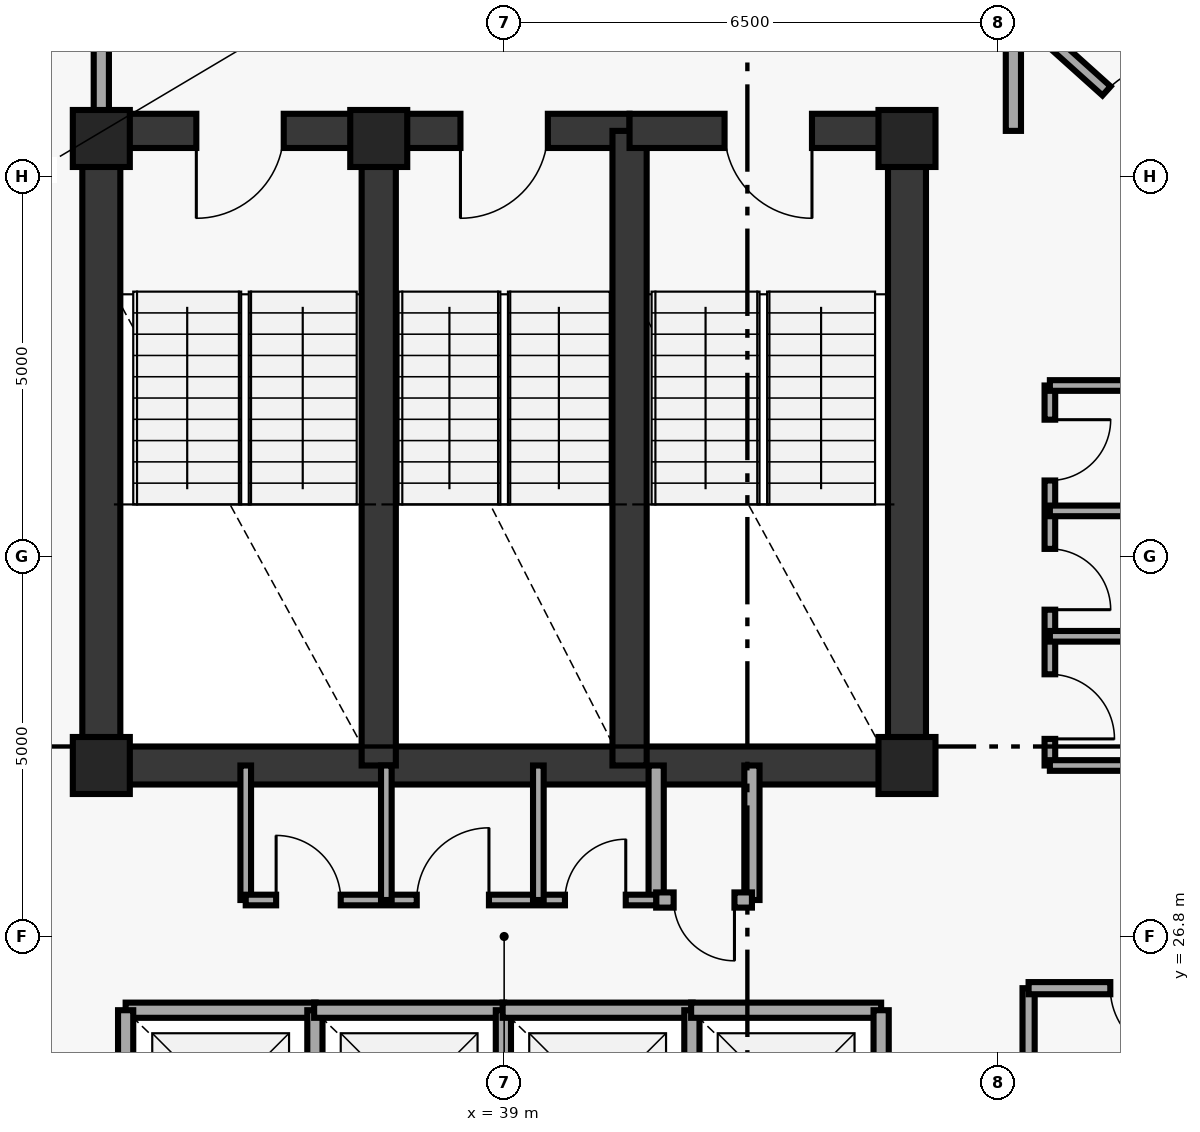
"""IFC4 building model, lengths in metres.
Left out: names, types, materials, properties, quantities, classifications, styles, units other than length and angle.
Written with IfcOpenShell. Run it as: python <this file> out.ifc"""

import sys

from ifc_helpers import new_model, si_unit, direction, frame, frame_2d, origin, origin_2d, place, context, subcontext, project, spatial, rectangle, extrude, element, fill, save


model = new_model("IFC4")
c1 = context("Model", 3, precision=1e-05, world=origin(), true_north=direction((0.0, 1.0)))
c2 = subcontext(c1, "Body", "Model", "MODEL_VIEW")
j1 = project(units=[si_unit("LENGTHUNIT", "METRE"), si_unit("PLANEANGLEUNIT", "RADIAN")], contexts=[c1])
p1 = place(None, origin())
s1 = spatial("IfcSite", under=j1, at=p1, CompositionType="ELEMENT")
p2 = place(p1, origin())
s2 = spatial("IfcBuilding", under=s1, at=p2, CompositionType="ELEMENT")
p3 = place(p2, frame((0.0, 0.0, 255.6)))
s3 = spatial("IfcBuildingStorey", under=s2, at=p3, CompositionType="ELEMENT", Elevation=255.6)
for number, where, z_axis, x_axis in (
    (1, (44.3, 29.05, 0.0), (0.0, 0.0, 1.0), (1.0, 0.0, 0.0)),
    (2, (44.3, 37.3, 0.0), (0.0, 0.0, 1.0), (1.0, 0.0, 0.0)),
    (3, (37.35, 37.3, 0.0), (0.0, 0.0, 1.0), (1.0, 0.0, 0.0)),
    (4, (33.7, 37.3, 0.0), (0.0, 0.0, 1.0), (1.0, 0.0, 0.0)),
    (5, (33.7, 29.05, 0.0), (0.0, 0.0, 1.0), (1.0, 0.0, 0.0)),
):
    element("IfcColumn", number, at=place(p3, frame(where, z_axis=z_axis, x_axis=x_axis)), inside=s3, PredefinedType="PILASTER", context=c2, shape_type="SweptSolid", body=[
        extrude(rectangle(XDim=0.75, YDim=0.75, at=origin_2d()), origin(), (0.0, 0.0, 1.0), 3.54),
    ])
for number, where, z_axis, x_axis in (
    (6, (33.7, 29.05, 0.0), (0.0, 0.0, 1.0), (0.0, 1.0, 0.0)),
    (7, (44.3, 29.05, 0.0), (0.0, 0.0, 1.0), (0.0, 1.0, 0.0)),
):
    element("IfcWall", number, at=place(p3, frame(where, z_axis=z_axis, x_axis=x_axis)), inside=s3, PredefinedType="SHEAR", context=c2, shape_type="SweptSolid", body=[
        extrude(rectangle(XDim=8.35, YDim=0.5, at=frame_2d((4.175, 0.0))), origin(), (0.0, 0.0, 1.0), 3.54),
    ])
p4 = place(p3, frame((33.7, 29.05, 0.0), z_axis=(0.0, 0.0, 1.0), x_axis=(1.0, 0.0, 0.0)))
e8 = element("IfcWall", 8, at=p4, inside=s3, PredefinedType="SHEAR", context=c2, shape_type="SweptSolid", body=[
    extrude(rectangle(XDim=10.6, YDim=0.5, at=frame_2d((5.3, 0.0))), origin(), (0.0, 0.0, 1.0), 3.54),
])
p5 = place(p3, frame((37.35, 37.4, 0.0), z_axis=(0.0, 0.0, 1.0), x_axis=(-1.0, 0.0, 0.0)))
e9 = element("IfcWall", 9, at=p5, inside=s3, PredefinedType="SHEAR", context=c2, shape_type="SweptSolid", body=[
    extrude(rectangle(XDim=3.65, YDim=0.45, at=frame_2d((1.825, 0.0))), origin(), (0.0, 0.0, 1.0), 3.54),
])
p6 = place(p5, frame((1.25, 0.0, 0.0)))
e10 = element("IfcOpeningElement", 10, at=p6, cuts=e9, PredefinedType="OPENING", context=c2, shape_type="SweptSolid", body=[
    extrude(rectangle(XDim=1.15, YDim=2.15, at=frame_2d((0.575, 1.075))), frame((0.0, 0.235, 0.0), z_axis=(0.0, -1.0, 0.0), x_axis=(1.0, 0.0, 0.0)), (0.0, 0.0, 1.0), 0.47),
])
p7 = place(p3, frame((37.35, 29.05, 0.0), z_axis=(0.0, 0.0, 1.0), x_axis=(0.0, 1.0, 0.0)))
e11 = element("IfcWall", 11, at=p7, inside=s3, PredefinedType="SHEAR", context=c2, shape_type="SweptSolid", body=[
    extrude(rectangle(XDim=8.35, YDim=0.45, at=frame_2d((4.175, 0.0))), origin(), (0.0, 0.0, 1.0), 3.54),
])
p8 = place(p3, frame((40.65, 37.4, 0.0), z_axis=(0.0, 0.0, 1.0), x_axis=(-1.0, 0.0, 0.0)))
e12 = element("IfcWall", 12, at=p8, inside=s3, PredefinedType="SHEAR", context=c2, shape_type="SweptSolid", body=[
    extrude(rectangle(XDim=3.3, YDim=0.45, at=frame_2d((1.65, 0.0))), origin(), (0.0, 0.0, 1.0), 3.54),
])
p9 = place(p8, frame((1.075, 0.0, 0.0)))
e13 = element("IfcOpeningElement", 13, at=p9, cuts=e12, PredefinedType="OPENING", context=c2, shape_type="SweptSolid", body=[
    extrude(rectangle(XDim=1.15, YDim=2.15, at=frame_2d((0.575, 1.075))), frame((0.0, 0.235, 0.0), z_axis=(0.0, -1.0, 0.0), x_axis=(1.0, 0.0, 0.0)), (0.0, 0.0, 1.0), 0.47),
])
p10 = place(p3, frame((40.65, 29.05, 0.0), z_axis=(0.0, 0.0, 1.0), x_axis=(0.0, 1.0, 0.0)))
e14 = element("IfcWall", 14, at=p10, inside=s3, PredefinedType="SHEAR", context=c2, shape_type="SweptSolid", body=[
    extrude(rectangle(XDim=8.35, YDim=0.45, at=frame_2d((4.175, 0.0))), origin(), (0.0, 0.0, 1.0), 3.54),
])
p11 = place(p3, frame((44.3, 37.4, 0.0), z_axis=(0.0, 0.0, 1.0), x_axis=(-1.0, 0.0, 0.0)))
e15 = element("IfcWall", 15, at=p11, inside=s3, PredefinedType="SHEAR", context=c2, shape_type="SweptSolid", body=[
    extrude(rectangle(XDim=3.65, YDim=0.45, at=frame_2d((1.825, 0.0))), origin(), (0.0, 0.0, 1.0), 3.54),
])
p12 = place(p11, frame((1.25, 0.0, 0.0)))
e16 = element("IfcOpeningElement", 16, at=p12, cuts=e15, PredefinedType="OPENING", context=c2, shape_type="SweptSolid", body=[
    extrude(rectangle(XDim=1.15, YDim=2.15, at=frame_2d((0.575, 1.075))), frame((0.0, 0.235, 0.0), z_axis=(0.0, -1.0, 0.0), x_axis=(1.0, 0.0, 0.0)), (0.0, 0.0, 1.0), 0.47),
])
for number, where, z_axis, x_axis in (
    (17, (33.7, 37.4, 0.0), (0.0, 0.0, 1.0), (0.0, 1.0, 0.0)),
    (18, (45.7, 37.4, 0.0), (0.0, 0.0, 1.0), (0.0, 1.0, 0.0)),
):
    element("IfcWall", number, at=place(p3, frame(where, z_axis=z_axis, x_axis=x_axis)), inside=s3, PredefinedType="SOLIDWALL", context=c2, shape_type="SweptSolid", body=[
        extrude(rectangle(XDim=1.88, YDim=0.2, at=frame_2d((0.94, 0.0))), origin(), (0.0, 0.0, 1.0), 3.54),
    ])
p13 = place(p3, frame((35.6, 27.28, 0.0), z_axis=(0.0, 0.0, 1.0), x_axis=(0.0, 1.0, 0.0)))
e19 = element("IfcWall", 19, at=p13, inside=s3, PredefinedType="PARTITIONING", context=c2, shape_type="SweptSolid", body=[
    extrude(rectangle(XDim=1.77, YDim=0.14, at=frame_2d((0.885, 0.0))), origin(), (0.0, 0.0, 1.0), 3.54),
])
for number, where, z_axis, x_axis in (
    (20, (41.0, 27.28, 0.0), (0.0, 0.0, 1.0), (0.0, 1.0, 0.0)),
    (21, (42.26, 27.28, 0.0), (0.0, 0.0, 1.0), (0.0, 1.0, 0.0)),
):
    element("IfcWall", number, at=place(p3, frame(where, z_axis=z_axis, x_axis=x_axis)), inside=s3, PredefinedType="SOLIDWALL", context=c2, shape_type="SweptSolid", body=[
        extrude(rectangle(XDim=1.77, YDim=0.2, at=frame_2d((0.885, 0.0))), origin(), (0.0, 0.0, 1.0), 3.54),
    ])
p14 = place(p3, frame((41.0, 27.28, 0.0), z_axis=(0.0, 0.0, 1.0), x_axis=(1.0, 0.0, 0.0)))
e22 = element("IfcWall", 22, at=p14, inside=s3, PredefinedType="SOLIDWALL", context=c2, shape_type="SweptSolid", body=[
    extrude(rectangle(XDim=1.26, YDim=0.2, at=frame_2d((0.63, 0.0))), origin(), (0.0, 0.0, 1.0), 3.54),
])
p15 = place(p14, frame((0.23, 0.0, 0.0)))
e23 = element("IfcOpeningElement", 23, at=p15, cuts=e22, PredefinedType="OPENING", context=c2, shape_type="SweptSolid", body=[
    extrude(rectangle(XDim=0.8, YDim=2.05, at=frame_2d((0.4, 1.025))), frame((0.0, 0.11, 0.0), z_axis=(0.0, -1.0, 0.0), x_axis=(1.0, 0.0, 0.0)), (0.0, 0.0, 1.0), 0.22),
])
p16 = place(p3, frame((34.02, 25.83, 0.0), z_axis=(0.0, 0.0, 1.0), x_axis=(1.0, 0.0, 0.0)))
e24 = element("IfcWall", 24, at=p16, inside=s3, PredefinedType="SOLIDWALL", context=c2, shape_type="SweptSolid", body=[
    extrude(rectangle(XDim=2.5, YDim=0.2, at=frame_2d((1.25, 0.0))), origin(), (0.0, 0.0, 1.0), 3.54),
])
for number, where, z_axis, x_axis in (
    (25, (34.02, 23.42, 0.0), (0.0, 0.0, 1.0), (0.0, 1.0, 0.0)),
    (26, (36.51, 23.42, 0.0), (0.0, 0.0, 1.0), (0.0, 1.0, 0.0)),
):
    element("IfcWall", number, at=place(p3, frame(where, z_axis=z_axis, x_axis=x_axis)), inside=s3, PredefinedType="SOLIDWALL", context=c2, shape_type="SweptSolid", body=[
        extrude(rectangle(XDim=2.41, YDim=0.2, at=frame_2d((1.205, 0.0))), origin(), (0.0, 0.0, 1.0), 3.54),
    ])
p17 = place(p3, frame((36.5, 25.83, 0.0), z_axis=(0.0, 0.0, 1.0), x_axis=(1.0, 0.0, 0.0)))
e27 = element("IfcWall", 27, at=p17, inside=s3, PredefinedType="SOLIDWALL", context=c2, shape_type="SweptSolid", body=[
    extrude(rectangle(XDim=2.5, YDim=0.2, at=frame_2d((1.25, 0.0))), origin(), (0.0, 0.0, 1.0), 3.54),
])
p18 = place(p3, frame((38.99, 23.42, 0.0), z_axis=(0.0, 0.0, 1.0), x_axis=(0.0, 1.0, 0.0)))
e28 = element("IfcWall", 28, at=p18, inside=s3, PredefinedType="SOLIDWALL", context=c2, shape_type="SweptSolid", body=[
    extrude(rectangle(XDim=2.41, YDim=0.2, at=frame_2d((1.205, 0.0))), origin(), (0.0, 0.0, 1.0), 3.54),
])
p19 = place(p3, frame((38.98, 25.83, 0.0), z_axis=(0.0, 0.0, 1.0), x_axis=(1.0, 0.0, 0.0)))
e29 = element("IfcWall", 29, at=p19, inside=s3, PredefinedType="SOLIDWALL", context=c2, shape_type="SweptSolid", body=[
    extrude(rectangle(XDim=2.5, YDim=0.2, at=frame_2d((1.25, 0.0))), origin(), (0.0, 0.0, 1.0), 3.54),
])
p20 = place(p3, frame((41.47, 23.42, 0.0), z_axis=(0.0, 0.0, 1.0), x_axis=(0.0, 1.0, 0.0)))
e30 = element("IfcWall", 30, at=p20, inside=s3, PredefinedType="SOLIDWALL", context=c2, shape_type="SweptSolid", body=[
    extrude(rectangle(XDim=2.41, YDim=0.2, at=frame_2d((1.205, 0.0))), origin(), (0.0, 0.0, 1.0), 3.54),
])
p21 = place(p3, frame((41.46, 25.83, 0.0), z_axis=(0.0, 0.0, 1.0), x_axis=(1.0, 0.0, 0.0)))
e31 = element("IfcWall", 31, at=p21, inside=s3, PredefinedType="SOLIDWALL", context=c2, shape_type="SweptSolid", body=[
    extrude(rectangle(XDim=2.5, YDim=0.2, at=frame_2d((1.25, 0.0))), origin(), (0.0, 0.0, 1.0), 3.54),
])
p22 = place(p3, frame((43.96, 23.42, 0.0), z_axis=(0.0, 0.0, 1.0), x_axis=(0.0, 1.0, 0.0)))
e32 = element("IfcWall", 32, at=p22, inside=s3, PredefinedType="SOLIDWALL", context=c2, shape_type="SweptSolid", body=[
    extrude(rectangle(XDim=2.41, YDim=0.2, at=frame_2d((1.205, 0.0))), origin(), (0.0, 0.0, 1.0), 3.54),
])
p23 = place(p3, frame((45.9, 19.05, 0.0), z_axis=(0.0, 0.0, 1.0), x_axis=(0.0, 1.0, 0.0)))
e33 = element("IfcWall", 33, at=p23, inside=s3, PredefinedType="PARTITIONING", context=c2, shape_type="SweptSolid", body=[
    extrude(rectangle(XDim=7.07, YDim=0.16, at=frame_2d((3.535, 0.0))), origin(), (0.0, 0.0, 1.0), 3.54),
])
p24 = place(p3, frame((48.95, 26.12, 0.0), z_axis=(0.0, 0.0, 1.0), x_axis=(-1.0, 0.0, 0.0)))
e34 = element("IfcWall", 34, at=p24, inside=s3, PredefinedType="PARTITIONING", context=c2, shape_type="SweptSolid", body=[
    extrude(rectangle(XDim=3.05, YDim=0.16, at=frame_2d((1.525, 0.0))), origin(), (0.0, 0.0, 1.0), 3.54),
])
p25 = place(p24, frame((1.075, 0.0, 0.0)))
e35 = element("IfcOpeningElement", 35, at=p25, cuts=e34, PredefinedType="OPENING", context=c2, shape_type="SweptSolid", body=[
    extrude(rectangle(XDim=0.9, YDim=2.1, at=frame_2d((0.45, 1.05))), frame((0.0, 0.09, 0.0), z_axis=(0.0, -1.0, 0.0), x_axis=(1.0, 0.0, 0.0)), (0.0, 0.0, 1.0), 0.18),
])
p26 = place(p3, frame((35.6, 27.28, 0.0), z_axis=(0.0, 0.0, 1.0), x_axis=(1.0, 0.0, 0.0)))
e36 = element("IfcWall", 36, at=p26, inside=s3, PredefinedType="PARTITIONING", context=c2, shape_type="SweptSolid", body=[
    extrude(rectangle(XDim=5.4, YDim=0.14, at=frame_2d((2.7, 0.0))), origin(), (0.0, 0.0, 1.0), 3.54),
])
p27 = place(p26, frame((0.4, 0.0, 0.0)))
e37 = element("IfcOpeningElement", 37, at=p27, cuts=e36, PredefinedType="OPENING", context=c2, shape_type="SweptSolid", body=[
    extrude(rectangle(XDim=0.85, YDim=2.1, at=frame_2d((0.425, 1.05))), frame((0.0, 0.08, 0.0), z_axis=(0.0, -1.0, 0.0), x_axis=(1.0, 0.0, 0.0)), (0.0, 0.0, 1.0), 0.16),
])
p28 = place(p26, frame((2.25, 0.0, 0.0)))
e38 = element("IfcOpeningElement", 38, at=p28, cuts=e36, PredefinedType="OPENING", context=c2, shape_type="SweptSolid", body=[
    extrude(rectangle(XDim=0.95, YDim=2.1, at=frame_2d((0.475, 1.05))), frame((0.0, 0.08, 0.0), z_axis=(0.0, -1.0, 0.0), x_axis=(1.0, 0.0, 0.0)), (0.0, 0.0, 1.0), 0.16),
])
p29 = place(p26, frame((4.2, 0.0, 0.0)))
e39 = element("IfcOpeningElement", 39, at=p29, cuts=e36, PredefinedType="OPENING", context=c2, shape_type="SweptSolid", body=[
    extrude(rectangle(XDim=0.8, YDim=2.05, at=frame_2d((0.4, 1.025))), frame((0.0, 0.08, 0.0), z_axis=(0.0, -1.0, 0.0), x_axis=(1.0, 0.0, 0.0)), (0.0, 0.0, 1.0), 0.16),
])
for number, where, z_axis, x_axis in (
    (40, (37.45, 27.28, 0.0), (0.0, 0.0, 1.0), (0.0, 1.0, 0.0)),
    (41, (39.45, 27.28, 0.0), (0.0, 0.0, 1.0), (0.0, 1.0, 0.0)),
):
    element("IfcWall", number, at=place(p3, frame(where, z_axis=z_axis, x_axis=x_axis)), inside=s3, PredefinedType="PARTITIONING", context=c2, shape_type="SweptSolid", body=[
        extrude(rectangle(XDim=1.77, YDim=0.14, at=frame_2d((0.885, 0.0))), origin(), (0.0, 0.0, 1.0), 3.54),
    ])
p30 = place(p3, frame((46.18, 34.05, 0.0), z_axis=(0.0, 0.0, 1.0), x_axis=(0.0, -1.0, 0.0)))
e42 = element("IfcWall", 42, at=p30, inside=s3, PredefinedType="PARTITIONING", context=c2, shape_type="SweptSolid", body=[
    extrude(rectangle(XDim=5.0, YDim=0.14, at=frame_2d((2.5, 0.0))), origin(), (0.0, 0.0, 1.0), 3.54),
])
p31 = place(p30, frame((3.8, 0.0, 0.0)))
e43 = element("IfcOpeningElement", 43, at=p31, cuts=e42, PredefinedType="OPENING", context=c2, shape_type="SweptSolid", body=[
    extrude(rectangle(XDim=0.85, YDim=2.1, at=frame_2d((0.425, 1.05))), frame((0.0, 0.08, 0.0), z_axis=(0.0, -1.0, 0.0), x_axis=(1.0, 0.0, 0.0)), (0.0, 0.0, 1.0), 0.16),
])
p32 = place(p30, frame((2.15, 0.0, 0.0)))
e44 = element("IfcOpeningElement", 44, at=p32, cuts=e42, PredefinedType="OPENING", context=c2, shape_type="SweptSolid", body=[
    extrude(rectangle(XDim=0.8, YDim=2.05, at=frame_2d((0.4, 1.025))), frame((0.0, 0.08, 0.0), z_axis=(0.0, -1.0, 0.0), x_axis=(1.0, 0.0, 0.0)), (0.0, 0.0, 1.0), 0.16),
])
p33 = place(p30, frame((0.45, 0.0, 0.0)))
e45 = element("IfcOpeningElement", 45, at=p33, cuts=e42, PredefinedType="OPENING", context=c2, shape_type="SweptSolid", body=[
    extrude(rectangle(XDim=0.8, YDim=2.05, at=frame_2d((0.4, 1.025))), frame((0.0, 0.08, 0.0), z_axis=(0.0, -1.0, 0.0), x_axis=(1.0, 0.0, 0.0)), (0.0, 0.0, 1.0), 0.16),
])
for number, where, z_axis, x_axis in (
    (46, (46.18, 29.05, 0.0), (0.0, 0.0, 1.0), (1.0, 0.0, 0.0)),
    (47, (46.18, 30.75, 0.0), (0.0, 0.0, 1.0), (1.0, 0.0, 0.0)),
    (48, (46.18, 32.4, 0.0), (0.0, 0.0, 1.0), (1.0, 0.0, 0.0)),
    (49, (46.18, 34.05, 0.0), (0.0, 0.0, 1.0), (1.0, 0.0, 0.0)),
):
    element("IfcWall", number, at=place(p3, frame(where, z_axis=z_axis, x_axis=x_axis)), inside=s3, PredefinedType="PARTITIONING", context=c2, shape_type="SweptSolid", body=[
        extrude(rectangle(XDim=1.64, YDim=0.14, at=frame_2d((0.82, 0.0))), origin(), (0.0, 0.0, 1.0), 3.54),
    ])
p34 = place(p3, frame((45.235, 39.444, 0.0), z_axis=(0.0, 0.0, 1.0), x_axis=(0.743958104357, -0.668226263299, 0.0)))
e50 = element("IfcWall", 50, at=p34, inside=s3, PredefinedType="PARTITIONING", context=c2, shape_type="SweptSolid", body=[
    extrude(rectangle(XDim=3.472, YDim=0.16, at=frame_2d((1.736, 0.0))), origin(), (0.0, 0.0, 1.0), 3.54),
])
p35 = place(p34, frame((2.272, 0.0, 0.0)))
e51 = element("IfcOpeningElement", 51, at=p35, cuts=e50, PredefinedType="OPENING", context=c2, shape_type="SweptSolid", body=[
    extrude(rectangle(XDim=1.0, YDim=2.15, at=frame_2d((0.5, 1.075))), frame((0.0, 0.09, 0.0), z_axis=(0.0, -1.0, 0.0), x_axis=(1.0, 0.0, 0.0)), (0.0, 0.0, 1.0), 0.18),
])
p36 = place(p3, frame((46.35, 40.795, 0.0), z_axis=(0.0, 0.0, 1.0), x_axis=(0.764348134159, -0.644803791713, 0.0)))
e52 = element("IfcWall", 52, at=p36, inside=s3, PredefinedType="PARTITIONING", context=c2, shape_type="SweptSolid", body=[
    extrude(rectangle(XDim=3.982, YDim=0.125, at=frame_2d((1.991, 0.0))), origin(), (0.0, 0.0, 1.0), 3.54),
])
p37 = place(p36, frame((2.63, 0.0, 0.0)))
e53 = element("IfcOpeningElement", 53, at=p37, cuts=e52, PredefinedType="OPENING", context=c2, shape_type="SweptSolid", body=[
    extrude(rectangle(XDim=0.9, YDim=2.1, at=frame_2d((0.45, 1.05))), frame((0.0, 0.073, 0.0), z_axis=(0.0, -1.0, 0.0), x_axis=(1.0, 0.0, 0.0)), (0.0, 0.0, 1.0), 0.145),
])
p38 = place(p3, frame((33.3, 39.167, 0.0), z_axis=(0.0, 0.0, 1.0), x_axis=(-0.623915746766, -0.781491612839, 0.0)))
e54 = element("IfcWall", 54, at=p38, inside=s3, PredefinedType="PARTITIONING", context=c2, shape_type="SweptSolid", body=[
    extrude(rectangle(XDim=6.688, YDim=0.16, at=frame_2d((3.344, 0.0))), origin(), (0.0, 0.0, 1.0), 3.54),
])
p39 = place(p6, origin())
e55 = element("IfcDoor", 55, at=p39, inside=s3, OperationType="SINGLE_SWING_RIGHT", PredefinedType="DOOR", context=c2, shape_type="SweptSolid", body=[
    extrude(rectangle(XDim=1.15, YDim=2.15, at=frame_2d((0.575, 1.075))), frame((0.0, 0.025, 0.0), z_axis=(0.0, -1.0, 0.0), x_axis=(1.0, 0.0, 0.0)), (0.0, 0.0, 1.0), 0.05),
])
fill(e10, e55)
p40 = place(p9, origin())
e56 = element("IfcDoor", 56, at=p40, inside=s3, OperationType="SINGLE_SWING_RIGHT", PredefinedType="DOOR", context=c2, shape_type="SweptSolid", body=[
    extrude(rectangle(XDim=1.15, YDim=2.15, at=frame_2d((0.575, 1.075))), frame((0.0, 0.025, 0.0), z_axis=(0.0, -1.0, 0.0), x_axis=(1.0, 0.0, 0.0)), (0.0, 0.0, 1.0), 0.05),
])
fill(e13, e56)
p41 = place(p12, origin())
e57 = element("IfcDoor", 57, at=p41, inside=s3, OperationType="SINGLE_SWING_LEFT", PredefinedType="DOOR", context=c2, shape_type="SweptSolid", body=[
    extrude(rectangle(XDim=1.15, YDim=2.15, at=frame_2d((0.575, 1.075))), frame((0.0, 0.025, 0.0), z_axis=(0.0, -1.0, 0.0), x_axis=(1.0, 0.0, 0.0)), (0.0, 0.0, 1.0), 0.05),
])
fill(e16, e57)
p42 = place(p15, origin())
e58 = element("IfcDoor", 58, at=p42, inside=s3, OperationType="SINGLE_SWING_RIGHT", PredefinedType="DOOR", context=c2, shape_type="SweptSolid", body=[
    extrude(rectangle(XDim=0.8, YDim=2.05, at=frame_2d((0.4, 1.025))), frame((0.0, 0.025, 0.0), z_axis=(0.0, -1.0, 0.0), x_axis=(1.0, 0.0, 0.0)), (0.0, 0.0, 1.0), 0.05),
])
fill(e23, e58)
p43 = place(p25, origin())
e59 = element("IfcDoor", 59, at=p43, inside=s3, OperationType="SINGLE_SWING_LEFT", PredefinedType="DOOR", context=c2, shape_type="SweptSolid", body=[
    extrude(rectangle(XDim=0.9, YDim=2.1, at=frame_2d((0.45, 1.05))), frame((0.0, 0.025, 0.0), z_axis=(0.0, -1.0, 0.0), x_axis=(1.0, 0.0, 0.0)), (0.0, 0.0, 1.0), 0.05),
])
fill(e35, e59)
p44 = place(p27, origin())
e60 = element("IfcDoor", 60, at=p44, inside=s3, OperationType="SINGLE_SWING_LEFT", PredefinedType="DOOR", context=c2, shape_type="SweptSolid", body=[
    extrude(rectangle(XDim=0.85, YDim=2.1, at=frame_2d((0.425, 1.05))), frame((0.0, 0.025, 0.0), z_axis=(0.0, -1.0, 0.0), x_axis=(1.0, 0.0, 0.0)), (0.0, 0.0, 1.0), 0.05),
])
fill(e37, e60)
p45 = place(p28, origin())
e61 = element("IfcDoor", 61, at=p45, inside=s3, OperationType="SINGLE_SWING_RIGHT", PredefinedType="DOOR", context=c2, shape_type="SweptSolid", body=[
    extrude(rectangle(XDim=0.95, YDim=2.1, at=frame_2d((0.475, 1.05))), frame((0.0, 0.025, 0.0), z_axis=(0.0, -1.0, 0.0), x_axis=(1.0, 0.0, 0.0)), (0.0, 0.0, 1.0), 0.05),
])
fill(e38, e61)
p46 = place(p29, origin())
e62 = element("IfcDoor", 62, at=p46, inside=s3, OperationType="SINGLE_SWING_RIGHT", PredefinedType="DOOR", context=c2, shape_type="SweptSolid", body=[
    extrude(rectangle(XDim=0.8, YDim=2.05, at=frame_2d((0.4, 1.025))), frame((0.0, 0.025, 0.0), z_axis=(0.0, -1.0, 0.0), x_axis=(1.0, 0.0, 0.0)), (0.0, 0.0, 1.0), 0.05),
])
fill(e39, e62)
p47 = place(p31, origin())
e63 = element("IfcDoor", 63, at=p47, inside=s3, OperationType="SINGLE_SWING_RIGHT", PredefinedType="DOOR", context=c2, shape_type="SweptSolid", body=[
    extrude(rectangle(XDim=0.85, YDim=2.1, at=frame_2d((0.425, 1.05))), frame((0.0, 0.025, 0.0), z_axis=(0.0, -1.0, 0.0), x_axis=(1.0, 0.0, 0.0)), (0.0, 0.0, 1.0), 0.05),
])
fill(e43, e63)
p48 = place(p32, origin())
e64 = element("IfcDoor", 64, at=p48, inside=s3, OperationType="SINGLE_SWING_RIGHT", PredefinedType="DOOR", context=c2, shape_type="SweptSolid", body=[
    extrude(rectangle(XDim=0.8, YDim=2.05, at=frame_2d((0.4, 1.025))), frame((0.0, 0.025, 0.0), z_axis=(0.0, -1.0, 0.0), x_axis=(1.0, 0.0, 0.0)), (0.0, 0.0, 1.0), 0.05),
])
fill(e44, e64)
p49 = place(p33, origin())
e65 = element("IfcDoor", 65, at=p49, inside=s3, OperationType="SINGLE_SWING_LEFT", PredefinedType="DOOR", context=c2, shape_type="SweptSolid", body=[
    extrude(rectangle(XDim=0.8, YDim=2.05, at=frame_2d((0.4, 1.025))), frame((0.0, 0.025, 0.0), z_axis=(0.0, -1.0, 0.0), x_axis=(1.0, 0.0, 0.0)), (0.0, 0.0, 1.0), 0.05),
])
fill(e45, e65)
p50 = place(p35, origin())
e66 = element("IfcDoor", 66, at=p50, inside=s3, OperationType="SINGLE_SWING_RIGHT", PredefinedType="DOOR", context=c2, shape_type="SweptSolid", body=[
    extrude(rectangle(XDim=1.0, YDim=2.15, at=frame_2d((0.5, 1.075))), frame((0.0, 0.025, 0.0), z_axis=(0.0, -1.0, 0.0), x_axis=(1.0, 0.0, 0.0)), (0.0, 0.0, 1.0), 0.05),
])
fill(e51, e66)
save(model, sys.argv[1])
